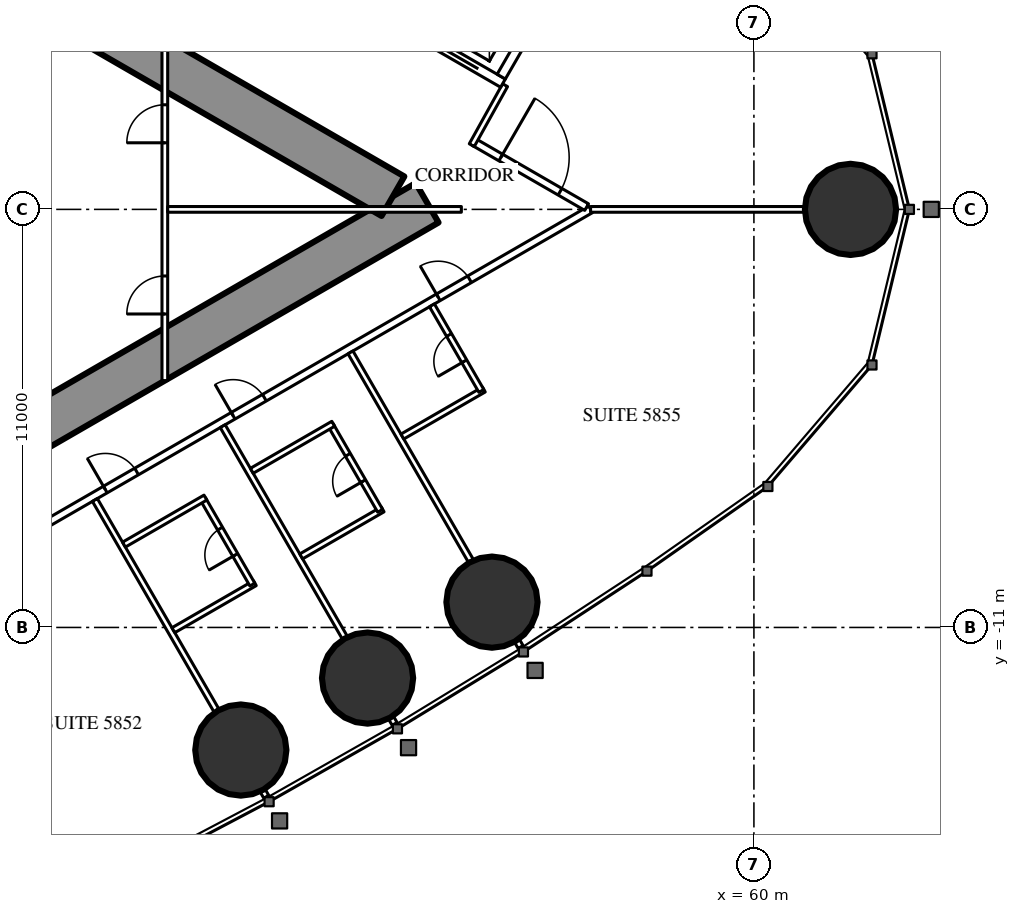
"""IFC4 building model, lengths in metres.
Left out: names, types, materials, properties, quantities, classifications, styles, units other than length and angle.
Written with IfcOpenShell. Run it as: python <this file> out.ifc"""

import sys

from ifc_helpers import new_model, si_unit, direction, frame, frame_2d, origin, origin_2d, place, context, subcontext, project, spatial, rectangle, circle, extrude, element, fill, save


model = new_model("IFC4")
c1 = context("Model", 3, precision=1e-05, world=origin(), true_north=direction((0.0, 1.0)))
c2 = subcontext(c1, "Body", "Model", "MODEL_VIEW")
j1 = project(units=[si_unit("LENGTHUNIT", "METRE"), si_unit("PLANEANGLEUNIT", "RADIAN")], contexts=[c1])
p1 = place(None, origin())
s1 = spatial("IfcSite", under=j1, at=p1, CompositionType="ELEMENT")
p2 = place(p1, origin())
s2 = spatial("IfcBuilding", under=s1, at=p2, CompositionType="ELEMENT")
p3 = place(p2, frame((0.0, 0.0, 218.9)))
s3 = spatial("IfcBuildingStorey", under=s2, at=p3, CompositionType="ELEMENT", Elevation=218.9)
for number, where, z_axis, x_axis in (
    (1, (62.542, 0.0, 0.0), (0.0, 0.0, 1.0), (1.0, 0.0, 0.0)),
    (2, (46.499, -14.226, 0.0), (0.0, 0.0, 1.0), (1.0, 0.0, 0.0)),
    (3, (49.834, -12.332, 0.0), (0.0, 0.0, 1.0), (1.0, 0.0, 0.0)),
    (4, (53.108, -10.334, 0.0), (0.0, 0.0, 1.0), (1.0, 0.0, 0.0)),
):
    element("IfcColumn", number, at=place(p3, frame(where, z_axis=z_axis, x_axis=x_axis)), inside=s3, PredefinedType="COLUMN", context=c2, shape_type="SweptSolid", body=[
        extrude(circle(Radius=1.2, at=origin_2d()), origin(), (0.0, 0.0, 1.0), 3.6),
    ])
p4 = place(p3, frame((27.2, -13.8, 0.0), z_axis=(0.0, 0.0, 1.0), x_axis=(0.866027159892, 0.499996958321, 0.0)))
e5 = element("IfcWall", 5, at=p4, inside=s3, PredefinedType="SHEAR", context=c2, shape_type="SweptSolid", body=[
    extrude(rectangle(XDim=27.947, YDim=1.2, at=frame_2d((13.973, 0.0))), origin(), (0.0, 0.0, 1.0), 3.6),
])
p5 = place(p4, frame((4.6, 0.0, 0.0)))
e6 = element("IfcOpeningElement", 6, at=p5, cuts=e5, PredefinedType="OPENING", context=c2, shape_type="SweptSolid", body=[
    extrude(rectangle(XDim=1.0, YDim=2.2, at=frame_2d((0.5, 1.1))), frame((0.0, 0.61, 0.0), z_axis=(0.0, -1.0, 0.0), x_axis=(1.0, 0.0, 0.0)), (0.0, 0.0, 1.0), 1.22),
])
p6 = place(p4, frame((13.395, 0.0, 0.0)))
e7 = element("IfcOpeningElement", 7, at=p6, cuts=e5, PredefinedType="OPENING", context=c2, shape_type="SweptSolid", body=[
    extrude(rectangle(XDim=1.8, YDim=2.2, at=frame_2d((0.9, 1.1))), frame((0.0, 0.61, 0.0), z_axis=(0.0, -1.0, 0.0), x_axis=(1.0, 0.0, 0.0)), (0.0, 0.0, 1.0), 1.22),
])
p7 = place(p3, frame((27.2, 13.8, 0.0), z_axis=(0.0, 0.0, 1.0), x_axis=(0.866024515034, -0.500001539357, 0.0)))
e8 = element("IfcWall", 8, at=p7, inside=s3, PredefinedType="SHEAR", context=c2, shape_type="SweptSolid", body=[
    extrude(rectangle(XDim=26.907, YDim=1.2, at=frame_2d((13.454, 0.0))), origin(), (0.0, 0.0, 1.0), 3.6),
])
p8 = place(p7, frame((4.6, 0.0, 0.0)))
e9 = element("IfcOpeningElement", 9, at=p8, cuts=e8, PredefinedType="OPENING", context=c2, shape_type="SweptSolid", body=[
    extrude(rectangle(XDim=1.0, YDim=2.2, at=frame_2d((0.5, 1.1))), frame((0.0, 0.61, 0.0), z_axis=(0.0, -1.0, 0.0), x_axis=(1.0, 0.0, 0.0)), (0.0, 0.0, 1.0), 1.22),
])
p9 = place(p7, frame((13.395, 0.0, 0.0)))
e10 = element("IfcOpeningElement", 10, at=p9, cuts=e8, PredefinedType="OPENING", context=c2, shape_type="SweptSolid", body=[
    extrude(rectangle(XDim=1.8, YDim=2.2, at=frame_2d((0.9, 1.1))), frame((0.0, 0.61, 0.0), z_axis=(0.0, -1.0, 0.0), x_axis=(1.0, 0.0, 0.0)), (0.0, 0.0, 1.0), 1.22),
])
p10 = place(p3, frame((28.959, -15.44, 0.0), z_axis=(0.0, 0.0, 1.0), x_axis=(0.866025227435, 0.500000305447, 0.0)))
e11 = element("IfcWall", 11, at=p10, inside=s3, PredefinedType="PARTITIONING", context=c2, shape_type="SweptSolid", body=[
    extrude(rectangle(XDim=30.88, YDim=0.2, at=frame_2d((15.44, 0.0))), origin(), (0.0, 0.0, 1.0), 3.35),
])
p11 = place(p10, frame((1.494, 0.0, 0.0)))
e12 = element("IfcOpeningElement", 12, at=p11, cuts=e11, PredefinedType="OPENING", context=c2, shape_type="SweptSolid", body=[
    extrude(rectangle(XDim=1.8, YDim=2.03, at=frame_2d((0.9, 1.015))), frame((0.0, 0.11, 0.0), z_axis=(0.0, -1.0, 0.0), x_axis=(1.0, 0.0, 0.0)), (0.0, 0.0, 1.0), 0.22),
])
p12 = place(p10, frame((7.687, 0.0, 0.0)))
e13 = element("IfcOpeningElement", 13, at=p12, cuts=e11, PredefinedType="OPENING", context=c2, shape_type="SweptSolid", body=[
    extrude(rectangle(XDim=1.0, YDim=2.2, at=frame_2d((0.5, 1.1))), frame((0.0, 0.11, 0.0), z_axis=(0.0, -1.0, 0.0), x_axis=(1.0, 0.0, 0.0)), (0.0, 0.0, 1.0), 0.22),
])
p13 = place(p10, frame((16.137, 0.0, 0.0)))
e14 = element("IfcOpeningElement", 14, at=p13, cuts=e11, PredefinedType="OPENING", context=c2, shape_type="SweptSolid", body=[
    extrude(rectangle(XDim=0.95, YDim=2.2, at=frame_2d((0.475, 1.1))), frame((0.0, 0.11, 0.0), z_axis=(0.0, -1.0, 0.0), x_axis=(1.0, 0.0, 0.0)), (0.0, 0.0, 1.0), 0.22),
])
p14 = place(p10, frame((20.021, 0.0, 0.0)))
e15 = element("IfcOpeningElement", 15, at=p14, cuts=e11, PredefinedType="OPENING", context=c2, shape_type="SweptSolid", body=[
    extrude(rectangle(XDim=0.95, YDim=2.2, at=frame_2d((0.475, 1.1))), frame((0.0, 0.11, 0.0), z_axis=(0.0, -1.0, 0.0), x_axis=(1.0, 0.0, 0.0)), (0.0, 0.0, 1.0), 0.22),
])
p15 = place(p10, frame((26.253, 0.0, 0.0)))
e16 = element("IfcOpeningElement", 16, at=p15, cuts=e11, PredefinedType="OPENING", context=c2, shape_type="SweptSolid", body=[
    extrude(rectangle(XDim=0.95, YDim=2.2, at=frame_2d((0.475, 1.1))), frame((0.0, 0.11, 0.0), z_axis=(0.0, -1.0, 0.0), x_axis=(1.0, 0.0, 0.0)), (0.0, 0.0, 1.0), 0.22),
])
p16 = place(p3, frame((42.66, -7.646, 0.0), z_axis=(0.0, 0.0, 1.0), x_axis=(0.499996592859, -0.866027370889, 0.0)))
e17 = element("IfcWall", 17, at=p16, inside=s3, PredefinedType="PARTITIONING", context=c2, shape_type="SweptSolid", body=[
    extrude(rectangle(XDim=6.398, YDim=0.15, at=frame_2d((3.199, 0.0))), origin(), (0.0, 0.0, 1.0), 2.45),
])
p17 = place(p3, frame((47.079, -15.3, 0.0), z_axis=(0.0, 0.0, 1.0), x_axis=(0.499212083968, -0.866479829667, 0.0)))
e18 = element("IfcWall", 18, at=p17, inside=s3, PredefinedType="PARTITIONING", context=c2, shape_type="SweptSolid", body=[
    extrude(rectangle(XDim=0.179, YDim=0.15, at=frame_2d((0.09, 0.0))), origin(), (0.0, 0.0, 1.0), 2.45),
])
p18 = place(p3, frame((46.023, -5.704, 0.0), z_axis=(0.0, 0.0, 1.0), x_axis=(0.499984478165, -0.866034365135, 0.0)))
e19 = element("IfcWall", 19, at=p18, inside=s3, PredefinedType="PARTITIONING", context=c2, shape_type="SweptSolid", body=[
    extrude(rectangle(XDim=6.426, YDim=0.15, at=frame_2d((3.213, 0.0))), origin(), (0.0, 0.0, 1.0), 2.45),
])
p19 = place(p3, frame((50.456, -13.382, 0.0), z_axis=(0.0, 0.0, 1.0), x_axis=(0.500661834965, -0.865642955848, 0.0)))
e20 = element("IfcWall", 20, at=p19, inside=s3, PredefinedType="PARTITIONING", context=c2, shape_type="SweptSolid", body=[
    extrude(rectangle(XDim=0.18, YDim=0.15, at=frame_2d((0.09, 0.0))), origin(), (0.0, 0.0, 1.0), 2.45),
])
p20 = place(p3, frame((49.385, -3.763, 0.0), z_axis=(0.0, 0.0, 1.0), x_axis=(0.499999447814, -0.866025722589, 0.0)))
e21 = element("IfcWall", 21, at=p20, inside=s3, PredefinedType="PARTITIONING", context=c2, shape_type="SweptSolid", body=[
    extrude(rectangle(XDim=6.333, YDim=0.15, at=frame_2d((3.166, 0.0))), origin(), (0.0, 0.0, 1.0), 2.45),
])
p21 = place(p3, frame((53.771, -11.36, 0.0), z_axis=(0.0, 0.0, 1.0), x_axis=(0.499524978789, -0.866299483762, 0.0)))
e22 = element("IfcWall", 22, at=p21, inside=s3, PredefinedType="PARTITIONING", context=c2, shape_type="SweptSolid", body=[
    extrude(rectangle(XDim=0.178, YDim=0.15, at=frame_2d((0.089, 0.0))), origin(), (0.0, 0.0, 1.0), 2.45),
])
p22 = place(p3, frame((55.702, 0.0, 0.0), z_axis=(0.0, 0.0, 1.0), x_axis=(1.0, 0.0, 0.0)))
e23 = element("IfcWall", 23, at=p22, inside=s3, PredefinedType="PARTITIONING", context=c2, shape_type="SweptSolid", body=[
    extrude(rectangle(XDim=5.619, YDim=0.15, at=frame_2d((2.81, 0.0))), origin(), (0.0, 0.0, 1.0), 2.45),
])
p23 = place(p3, frame((52.639, 1.769, 0.0), z_axis=(0.0, 0.0, 1.0), x_axis=(0.866027340901, -0.4999966448, 0.0)))
e24 = element("IfcWall", 24, at=p23, inside=s3, PredefinedType="PARTITIONING", context=c2, shape_type="SweptSolid", body=[
    extrude(rectangle(XDim=3.417, YDim=0.2, at=frame_2d((1.708, 0.0))), origin(), (0.0, 0.0, 1.0), 3.35),
])
p24 = place(p23, frame((0.809, 0.0, 0.0)))
e25 = element("IfcOpeningElement", 25, at=p24, cuts=e24, PredefinedType="OPENING", context=c2, shape_type="SweptSolid", body=[
    extrude(rectangle(XDim=1.8, YDim=2.2, at=frame_2d((0.9, 1.1))), frame((0.0, 0.11, 0.0), z_axis=(0.0, -1.0, 0.0), x_axis=(1.0, 0.0, 0.0)), (0.0, 0.0, 1.0), 0.22),
])
p25 = place(p3, frame((52.576, 1.689, 0.0), z_axis=(0.0, 0.0, 1.0), x_axis=(0.485424724123, 0.874278466629, 0.0)))
e26 = element("IfcWall", 26, at=p25, inside=s3, PredefinedType="PARTITIONING", context=c2, shape_type="SweptSolid", body=[
    extrude(rectangle(XDim=1.805, YDim=0.15, at=frame_2d((0.903, 0.0))), origin(), (0.0, 0.0, 1.0), 3.35),
])
p26 = place(p3, frame((44.725, -11.072, 0.0), z_axis=(0.0, 0.0, 1.0), x_axis=(0.866006523861, 0.500032699561, 0.0)))
e27 = element("IfcWall", 27, at=p26, inside=s3, PredefinedType="PARTITIONING", context=c2, shape_type="SweptSolid", body=[
    extrude(rectangle(XDim=2.475, YDim=0.15, at=frame_2d((1.237, 0.0))), origin(), (0.0, 0.0, 1.0), 3.35),
])
p27 = place(p3, frame((45.503, -7.621, 0.0), z_axis=(0.0, 0.0, 1.0), x_axis=(0.500006934395, -0.866021400173, 0.0)))
e28 = element("IfcWall", 28, at=p27, inside=s3, PredefinedType="PARTITIONING", context=c2, shape_type="SweptSolid", body=[
    extrude(rectangle(XDim=2.6, YDim=0.15, at=frame_2d((1.3, 0.0))), origin(), (0.0, 0.0, 1.0), 3.35),
])
p28 = place(p27, frame((0.9, 0.0, 0.0)))
e29 = element("IfcOpeningElement", 29, at=p28, cuts=e28, PredefinedType="OPENING", context=c2, shape_type="SweptSolid", body=[
    extrude(rectangle(XDim=0.8, YDim=2.2, at=frame_2d((0.4, 1.1))), frame((0.0, 0.085, 0.0), z_axis=(0.0, -1.0, 0.0), x_axis=(1.0, 0.0, 0.0)), (0.0, 0.0, 1.0), 0.17),
])
for number, where, z_axis, x_axis in (
    (30, (43.425, -8.821, 0.0), (0.0, 0.0, 1.0), (0.866, 0.5, 0.0)),
    (31, (48.088, -9.13, 0.0), (0.0, 0.0, 1.0), (0.866, 0.5, 0.0)),
):
    element("IfcWall", number, at=place(p3, frame(where, z_axis=z_axis, x_axis=x_axis)), inside=s3, PredefinedType="PARTITIONING", context=c2, shape_type="SweptSolid", body=[
        extrude(rectangle(XDim=2.475, YDim=0.15, at=frame_2d((1.237, 0.0))), origin(), (0.0, 0.0, 1.0), 3.35),
    ])
p29 = place(p3, frame((48.866, -5.679, 0.0), z_axis=(0.0, 0.0, 1.0), x_axis=(0.500006934395, -0.866021400173, 0.0)))
e32 = element("IfcWall", 32, at=p29, inside=s3, PredefinedType="PARTITIONING", context=c2, shape_type="SweptSolid", body=[
    extrude(rectangle(XDim=2.6, YDim=0.15, at=frame_2d((1.3, 0.0))), origin(), (0.0, 0.0, 1.0), 3.35),
])
p30 = place(p29, frame((0.9, 0.0, 0.0)))
e33 = element("IfcOpeningElement", 33, at=p30, cuts=e32, PredefinedType="OPENING", context=c2, shape_type="SweptSolid", body=[
    extrude(rectangle(XDim=0.8, YDim=2.2, at=frame_2d((0.4, 1.1))), frame((0.0, 0.085, 0.0), z_axis=(0.0, -1.0, 0.0), x_axis=(1.0, 0.0, 0.0)), (0.0, 0.0, 1.0), 0.17),
])
p31 = place(p3, frame((46.788, -6.879, 0.0), z_axis=(0.0, 0.0, 1.0), x_axis=(0.866006523861, 0.500032699561, 0.0)))
e34 = element("IfcWall", 34, at=p31, inside=s3, PredefinedType="PARTITIONING", context=c2, shape_type="SweptSolid", body=[
    extrude(rectangle(XDim=2.475, YDim=0.15, at=frame_2d((1.237, 0.0))), origin(), (0.0, 0.0, 1.0), 3.35),
])
p32 = place(p3, frame((50.75, -5.977, 0.0), z_axis=(0.0, 0.0, 1.0), x_axis=(0.866031185235, 0.4999899861, 0.0)))
e35 = element("IfcWall", 35, at=p32, inside=s3, PredefinedType="PARTITIONING", context=c2, shape_type="SweptSolid", body=[
    extrude(rectangle(XDim=2.475, YDim=0.15, at=frame_2d((1.238, 0.0))), origin(), (0.0, 0.0, 1.0), 3.35),
])
p33 = place(p3, frame((51.529, -2.525, 0.0), z_axis=(0.0, 0.0, 1.0), x_axis=(0.500006934395, -0.866021400173, 0.0)))
e36 = element("IfcWall", 36, at=p33, inside=s3, PredefinedType="PARTITIONING", context=c2, shape_type="SweptSolid", body=[
    extrude(rectangle(XDim=2.6, YDim=0.15, at=frame_2d((1.3, 0.0))), origin(), (0.0, 0.0, 1.0), 3.35),
])
p34 = place(p33, frame((0.9, 0.0, 0.0)))
e37 = element("IfcOpeningElement", 37, at=p34, cuts=e36, PredefinedType="OPENING", context=c2, shape_type="SweptSolid", body=[
    extrude(rectangle(XDim=0.8, YDim=2.2, at=frame_2d((0.4, 1.1))), frame((0.0, 0.085, 0.0), z_axis=(0.0, -1.0, 0.0), x_axis=(1.0, 0.0, 0.0)), (0.0, 0.0, 1.0), 0.17),
])
p35 = place(p3, frame((44.5, -4.505, 0.0), z_axis=(0.0, 0.0, 1.0), x_axis=(0.0, 1.0, 0.0)))
e38 = element("IfcWall", 38, at=p35, inside=s3, PredefinedType="PARTITIONING", context=c2, shape_type="SweptSolid", body=[
    extrude(rectangle(XDim=9.009, YDim=0.15, at=frame_2d((4.505, 0.0))), origin(), (0.0, 0.0, 1.0), 3.35),
])
p36 = place(p35, frame((1.752, 0.0, 0.0)))
e39 = element("IfcOpeningElement", 39, at=p36, cuts=e38, PredefinedType="OPENING", context=c2, shape_type="SweptSolid", body=[
    extrude(rectangle(XDim=1.0, YDim=2.2, at=frame_2d((0.5, 1.1))), frame((0.0, 0.085, 0.0), z_axis=(0.0, -1.0, 0.0), x_axis=(1.0, 0.0, 0.0)), (0.0, 0.0, 1.0), 0.17),
])
p37 = place(p35, frame((6.257, 0.0, 0.0)))
e40 = element("IfcOpeningElement", 40, at=p37, cuts=e38, PredefinedType="OPENING", context=c2, shape_type="SweptSolid", body=[
    extrude(rectangle(XDim=1.0, YDim=2.2, at=frame_2d((0.5, 1.1))), frame((0.0, 0.085, 0.0), z_axis=(0.0, -1.0, 0.0), x_axis=(1.0, 0.0, 0.0)), (0.0, 0.0, 1.0), 0.17),
])
p38 = place(p3, frame((44.575, 0.0, 0.0), z_axis=(0.0, 0.0, 1.0), x_axis=(1.0, 0.0, 0.0)))
e41 = element("IfcWall", 41, at=p38, inside=s3, PredefinedType="PARTITIONING", context=c2, shape_type="SweptSolid", body=[
    extrude(rectangle(XDim=7.727, YDim=0.15, at=frame_2d((3.864, 0.0))), origin(), (0.0, 0.0, 1.0), 2.45),
])
p39 = place(p3, frame((47.681, 6.622, 0.0), z_axis=(0.0, 0.0, 1.0), x_axis=(0.86603344179, -0.499986077507, 0.0)))
e42 = element("IfcWall", 42, at=p39, inside=s3, PredefinedType="PARTITIONING", context=c2, shape_type="SweptSolid", body=[
    extrude(rectangle(XDim=6.6, YDim=0.25, at=frame_2d((3.3, 0.0))), origin(), (0.0, 0.0, 1.0), 3.35),
])
p40 = place(p39, frame((0.75, 0.0, 0.0)))
e43 = element("IfcOpeningElement", 43, at=p40, cuts=e42, PredefinedType="OPENING", context=c2, shape_type="SweptSolid", body=[
    extrude(rectangle(XDim=1.1, YDim=2.2, at=frame_2d((0.55, 1.1))), frame((0.0, 0.135, 0.0), z_axis=(0.0, -1.0, 0.0), x_axis=(1.0, 0.0, 0.0)), (0.0, 0.0, 1.0), 0.27),
])
p41 = place(p39, frame((2.75, 0.0, 0.0)))
e44 = element("IfcOpeningElement", 44, at=p41, cuts=e42, PredefinedType="OPENING", context=c2, shape_type="SweptSolid", body=[
    extrude(rectangle(XDim=1.1, YDim=2.2, at=frame_2d((0.55, 1.1))), frame((0.0, 0.135, 0.0), z_axis=(0.0, -1.0, 0.0), x_axis=(1.0, 0.0, 0.0)), (0.0, 0.0, 1.0), 0.27),
])
p42 = place(p39, frame((4.75, 0.0, 0.0)))
e45 = element("IfcOpeningElement", 45, at=p42, cuts=e42, PredefinedType="OPENING", context=c2, shape_type="SweptSolid", body=[
    extrude(rectangle(XDim=1.1, YDim=2.2, at=frame_2d((0.55, 1.1))), frame((0.0, 0.135, 0.0), z_axis=(0.0, -1.0, 0.0), x_axis=(1.0, 0.0, 0.0)), (0.0, 0.0, 1.0), 0.27),
])
p43 = place(p3, frame((53.352, 3.493, 0.0), z_axis=(0.0, 0.0, 1.0), x_axis=(0.499872130319, 0.866099216793, 0.0)))
e46 = element("IfcWall", 46, at=p43, inside=s3, PredefinedType="PARTITIONING", context=c2, shape_type="SweptSolid", body=[
    extrude(rectangle(XDim=3.2, YDim=0.25, at=frame_2d((1.6, 0.0))), origin(), (0.0, 0.0, 1.0), 3.35),
])
p44 = place(p28, origin())
e47 = element("IfcDoor", 47, at=p44, inside=s3, OperationType="SINGLE_SWING_RIGHT", PredefinedType="DOOR", context=c2, shape_type="SweptSolid", body=[
    extrude(rectangle(XDim=0.8, YDim=2.2, at=frame_2d((0.4, 1.1))), frame((0.0, 0.025, 0.0), z_axis=(0.0, -1.0, 0.0), x_axis=(1.0, 0.0, 0.0)), (0.0, 0.0, 1.0), 0.05),
])
fill(e29, e47)
p45 = place(p13, origin())
e48 = element("IfcDoor", 48, at=p45, inside=s3, OperationType="SINGLE_SWING_LEFT", PredefinedType="DOOR", context=c2, shape_type="SweptSolid", body=[
    extrude(rectangle(XDim=0.95, YDim=2.2, at=frame_2d((0.475, 1.1))), frame((0.0, 0.025, 0.0), z_axis=(0.0, -1.0, 0.0), x_axis=(1.0, 0.0, 0.0)), (0.0, 0.0, 1.0), 0.05),
])
fill(e14, e48)
p46 = place(p30, origin())
e49 = element("IfcDoor", 49, at=p46, inside=s3, OperationType="SINGLE_SWING_RIGHT", PredefinedType="DOOR", context=c2, shape_type="SweptSolid", body=[
    extrude(rectangle(XDim=0.8, YDim=2.2, at=frame_2d((0.4, 1.1))), frame((0.0, 0.025, 0.0), z_axis=(0.0, -1.0, 0.0), x_axis=(1.0, 0.0, 0.0)), (0.0, 0.0, 1.0), 0.05),
])
fill(e33, e49)
p47 = place(p14, origin())
e50 = element("IfcDoor", 50, at=p47, inside=s3, OperationType="SINGLE_SWING_LEFT", PredefinedType="DOOR", context=c2, shape_type="SweptSolid", body=[
    extrude(rectangle(XDim=0.95, YDim=2.2, at=frame_2d((0.475, 1.1))), frame((0.0, 0.025, 0.0), z_axis=(0.0, -1.0, 0.0), x_axis=(1.0, 0.0, 0.0)), (0.0, 0.0, 1.0), 0.05),
])
fill(e15, e50)
p48 = place(p34, origin())
e51 = element("IfcDoor", 51, at=p48, inside=s3, OperationType="SINGLE_SWING_RIGHT", PredefinedType="DOOR", context=c2, shape_type="SweptSolid", body=[
    extrude(rectangle(XDim=0.8, YDim=2.2, at=frame_2d((0.4, 1.1))), frame((0.0, 0.025, 0.0), z_axis=(0.0, -1.0, 0.0), x_axis=(1.0, 0.0, 0.0)), (0.0, 0.0, 1.0), 0.05),
])
fill(e37, e51)
p49 = place(p15, origin())
e52 = element("IfcDoor", 52, at=p49, inside=s3, OperationType="SINGLE_SWING_LEFT", PredefinedType="DOOR", context=c2, shape_type="SweptSolid", body=[
    extrude(rectangle(XDim=0.95, YDim=2.2, at=frame_2d((0.475, 1.1))), frame((0.0, 0.025, 0.0), z_axis=(0.0, -1.0, 0.0), x_axis=(1.0, 0.0, 0.0)), (0.0, 0.0, 1.0), 0.05),
])
fill(e16, e52)
p50 = place(p24, origin())
e53 = element("IfcDoor", 53, at=p50, inside=s3, OperationType="DOUBLE_DOOR_SINGLE_SWING", PredefinedType="DOOR", context=c2, shape_type="SweptSolid", body=[
    extrude(rectangle(XDim=1.8, YDim=2.2, at=frame_2d((0.9, 1.1))), frame((0.0, 0.025, 0.0), z_axis=(0.0, -1.0, 0.0), x_axis=(1.0, 0.0, 0.0)), (0.0, 0.0, 1.0), 0.05),
])
fill(e25, e53)
p51 = place(p36, origin())
e54 = element("IfcDoor", 54, at=p51, inside=s3, OperationType="SINGLE_SWING_LEFT", PredefinedType="DOOR", context=c2, shape_type="SweptSolid", body=[
    extrude(rectangle(XDim=1.0, YDim=2.2, at=frame_2d((0.5, 1.1))), frame((0.0, 0.025, 0.0), z_axis=(0.0, -1.0, 0.0), x_axis=(1.0, 0.0, 0.0)), (0.0, 0.0, 1.0), 0.05),
])
fill(e39, e54)
p52 = place(p37, origin())
e55 = element("IfcDoor", 55, at=p52, inside=s3, OperationType="SINGLE_SWING_LEFT", PredefinedType="DOOR", context=c2, shape_type="SweptSolid", body=[
    extrude(rectangle(XDim=1.0, YDim=2.2, at=frame_2d((0.5, 1.1))), frame((0.0, 0.025, 0.0), z_axis=(0.0, -1.0, 0.0), x_axis=(1.0, 0.0, 0.0)), (0.0, 0.0, 1.0), 0.05),
])
fill(e40, e55)
p53 = place(p42, origin())
e56 = element("IfcDoor", 56, at=p53, inside=s3, OperationType="DOUBLE_DOOR_SLIDING", PredefinedType="USERDEFINED", context=c2, shape_type="SweptSolid", body=[
    extrude(rectangle(XDim=1.1, YDim=2.2, at=frame_2d((0.55, 1.1))), frame((0.0, 0.025, 0.0), z_axis=(0.0, -1.0, 0.0), x_axis=(1.0, 0.0, 0.0)), (0.0, 0.0, 1.0), 0.05),
])
fill(e45, e56)
save(model, sys.argv[1])
